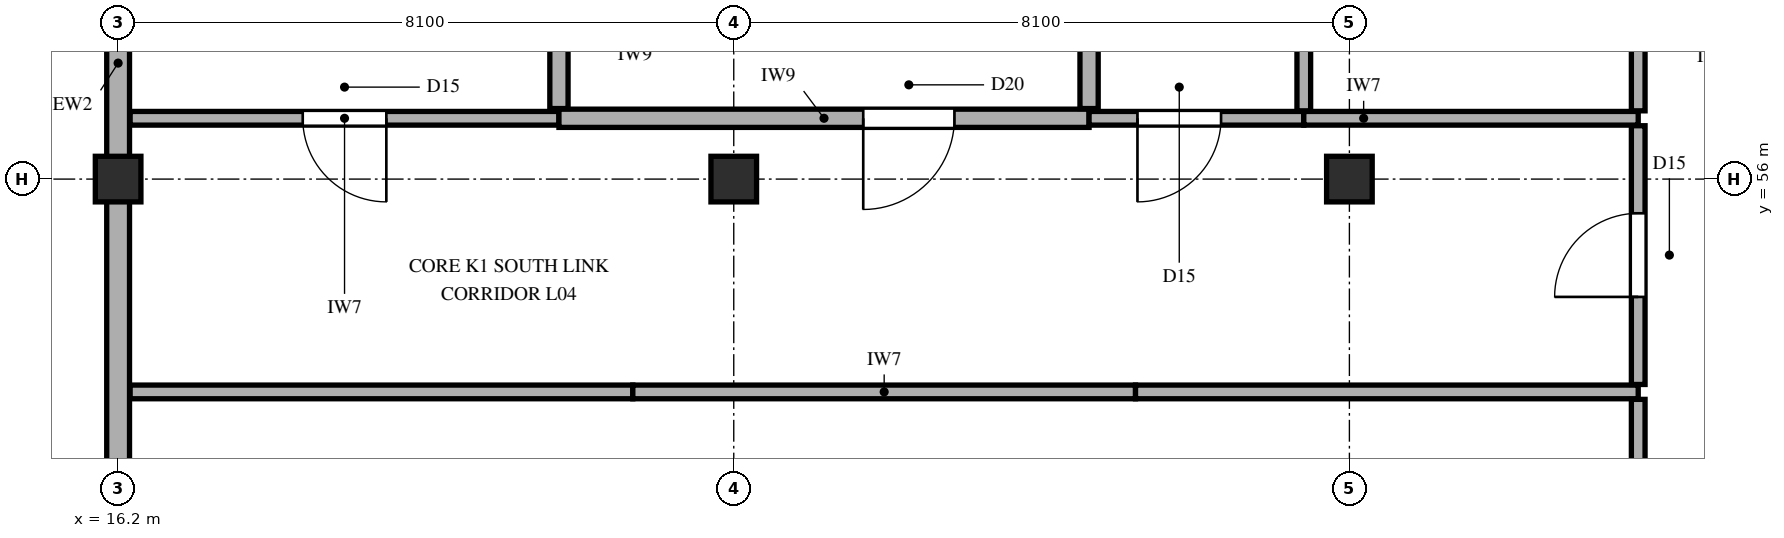
"""IFC4 building model, lengths in metres.
Left out: names, types, materials, properties, quantities, classifications, styles, units other than length and angle.
Written with IfcOpenShell. Run it as: python <this file> out.ifc"""

import sys

from ifc_helpers import new_model, si_unit, direction, frame, frame_2d, origin, origin_2d, place, context, subcontext, project, spatial, rectangle, extrude, element, fill, save


model = new_model("IFC4")
c1 = context("Model", 3, precision=1e-05, world=origin(), true_north=direction((0.0, 1.0)))
c2 = subcontext(c1, "Body", "Model", "MODEL_VIEW")
j1 = project(units=[si_unit("LENGTHUNIT", "METRE"), si_unit("PLANEANGLEUNIT", "RADIAN")], contexts=[c1])
p1 = place(None, origin())
s1 = spatial("IfcSite", under=j1, at=p1, CompositionType="ELEMENT")
p2 = place(p1, origin())
s2 = spatial("IfcBuilding", under=s1, at=p2, CompositionType="ELEMENT")
p3 = place(p2, frame((0.0, 0.0, 19.8)))
s3 = spatial("IfcBuildingStorey", under=s2, at=p3, CompositionType="ELEMENT", Elevation=19.8)
for number, where, z_axis, x_axis in (
    (1, (16.2, 56.0, 0.0), (0.0, 0.0, 1.0), (1.0, 0.0, 0.0)),
    (2, (24.3, 56.0, 0.0), (0.0, 0.0, 1.0), (1.0, 0.0, 0.0)),
    (3, (32.4, 56.0, 0.0), (0.0, 0.0, 1.0), (1.0, 0.0, 0.0)),
):
    element("IfcColumn", number, at=place(p3, frame(where, z_axis=z_axis, x_axis=x_axis)), inside=s3, PredefinedType="COLUMN", context=c2, shape_type="SweptSolid", body=[
        extrude(rectangle(XDim=0.6, YDim=0.6, at=origin_2d()), origin(), (0.0, 0.0, 1.0), 5.1),
    ])
p4 = place(p3, frame((16.2, 65.308, 0.0), z_axis=(0.0, 0.0, 1.0), x_axis=(0.0, -1.0, 0.0)))
e4 = element("IfcWall", 4, at=p4, inside=s3, PredefinedType="SOLIDWALL", context=c2, shape_type="SweptSolid", body=[
    extrude(rectangle(XDim=15.564, YDim=0.3, at=frame_2d((7.782, 0.0))), origin(), (0.0, 0.0, 1.0), 4.289),
])
for number, where, z_axis, x_axis in (
    (5, (16.358, 53.2, 0.0), (0.0, 0.0, 1.0), (1.0, 0.0, 0.0)),
    (6, (22.972, 53.2, 0.0), (0.0, 0.0, 1.0), (1.0, 0.0, 0.0)),
    (7, (29.586, 53.2, 0.0), (0.0, 0.0, 1.0), (1.0, 0.0, 0.0)),
):
    element("IfcWall", number, at=place(p3, frame(where, z_axis=z_axis, x_axis=x_axis)), inside=s3, PredefinedType="PARTITIONING", context=c2, shape_type="SweptSolid", body=[
        extrude(rectangle(XDim=6.614, YDim=0.18, at=frame_2d((3.307, 0.0))), origin(), (0.0, 0.0, 1.0), 4.86),
    ])
p5 = place(p3, frame((16.358, 56.8, 0.0), z_axis=(0.0, 0.0, 1.0), x_axis=(1.0, 0.0, 0.0)))
e8 = element("IfcWall", 8, at=p5, inside=s3, PredefinedType="PARTITIONING", context=c2, shape_type="SweptSolid", body=[
    extrude(rectangle(XDim=5.642, YDim=0.18, at=frame_2d((2.821, 0.0))), origin(), (0.0, 0.0, 1.0), 4.86),
])
p6 = place(p5, frame((2.271, 0.0, 0.0)))
e9 = element("IfcOpeningElement", 9, at=p6, cuts=e8, PredefinedType="OPENING", context=c2, shape_type="SweptSolid", body=[
    extrude(rectangle(XDim=1.1, YDim=2.2, at=frame_2d((0.55, 1.1))), frame((0.0, 0.1, 0.0), z_axis=(0.0, -1.0, 0.0), x_axis=(1.0, 0.0, 0.0)), (0.0, 0.0, 1.0), 0.2),
])
p7 = place(p3, frame((22.0, 56.8, 0.0), z_axis=(0.0, 0.0, 1.0), x_axis=(1.0, 0.0, 0.0)))
e10 = element("IfcWall", 10, at=p7, inside=s3, PredefinedType="PARTITIONING", context=c2, shape_type="SweptSolid", body=[
    extrude(rectangle(XDim=6.975, YDim=0.24, at=frame_2d((3.488, 0.0))), origin(), (0.0, 0.0, 1.0), 4.86),
])
p8 = place(p7, frame((4.003, 0.0, 0.0)))
e11 = element("IfcOpeningElement", 11, at=p8, cuts=e10, PredefinedType="OPENING", context=c2, shape_type="SweptSolid", body=[
    extrude(rectangle(XDim=1.2, YDim=2.3, at=frame_2d((0.6, 1.15))), frame((0.0, 0.13, 0.0), z_axis=(0.0, -1.0, 0.0), x_axis=(1.0, 0.0, 0.0)), (0.0, 0.0, 1.0), 0.26),
])
p9 = place(p3, frame((28.975, 56.8, 0.0), z_axis=(0.0, 0.0, 1.0), x_axis=(1.0, 0.0, 0.0)))
e12 = element("IfcWall", 12, at=p9, inside=s3, PredefinedType="PARTITIONING", context=c2, shape_type="SweptSolid", body=[
    extrude(rectangle(XDim=2.825, YDim=0.18, at=frame_2d((1.413, 0.0))), origin(), (0.0, 0.0, 1.0), 4.86),
])
p10 = place(p9, frame((0.636, 0.0, 0.0)))
e13 = element("IfcOpeningElement", 13, at=p10, cuts=e12, PredefinedType="OPENING", context=c2, shape_type="SweptSolid", body=[
    extrude(rectangle(XDim=1.1, YDim=2.2, at=frame_2d((0.55, 1.1))), frame((0.0, 0.1, 0.0), z_axis=(0.0, -1.0, 0.0), x_axis=(1.0, 0.0, 0.0)), (0.0, 0.0, 1.0), 0.2),
])
p11 = place(p3, frame((31.8, 56.8, 0.0), z_axis=(0.0, 0.0, 1.0), x_axis=(1.0, 0.0, 0.0)))
e14 = element("IfcWall", 14, at=p11, inside=s3, PredefinedType="PARTITIONING", context=c2, shape_type="SweptSolid", body=[
    extrude(rectangle(XDim=4.4, YDim=0.18, at=frame_2d((2.2, 0.0))), origin(), (0.0, 0.0, 1.0), 4.86),
])
p12 = place(p3, frame((22.0, 56.928, 0.0), z_axis=(0.0, 0.0, 1.0), x_axis=(0.0, 1.0, 0.0)))
e15 = element("IfcWall", 15, at=p12, inside=s3, PredefinedType="PARTITIONING", context=c2, shape_type="SweptSolid", body=[
    extrude(rectangle(XDim=3.214, YDim=0.24, at=frame_2d((1.607, 0.0))), origin(), (0.0, 0.0, 1.0), 4.86),
])
p13 = place(p12, frame((1.107, 0.0, 0.0)))
e16 = element("IfcOpeningElement", 16, at=p13, cuts=e15, PredefinedType="OPENING", context=c2, shape_type="SweptSolid", body=[
    extrude(rectangle(XDim=1.0, YDim=2.2, at=frame_2d((0.5, 1.1))), frame((0.0, 0.13, 0.0), z_axis=(0.0, -1.0, 0.0), x_axis=(1.0, 0.0, 0.0)), (0.0, 0.0, 1.0), 0.26),
])
p14 = place(p3, frame((28.975, 56.928, 0.0), z_axis=(0.0, 0.0, 1.0), x_axis=(0.0, 1.0, 0.0)))
e17 = element("IfcWall", 17, at=p14, inside=s3, PredefinedType="PARTITIONING", context=c2, shape_type="SweptSolid", body=[
    extrude(rectangle(XDim=3.214, YDim=0.24, at=frame_2d((1.607, 0.0))), origin(), (0.0, 0.0, 1.0), 4.86),
])
p15 = place(p3, frame((31.8, 56.898, 0.0), z_axis=(0.0, 0.0, 1.0), x_axis=(0.0, 1.0, 0.0)))
e18 = element("IfcWall", 18, at=p15, inside=s3, PredefinedType="PARTITIONING", context=c2, shape_type="SweptSolid", body=[
    extrude(rectangle(XDim=3.244, YDim=0.18, at=frame_2d((1.622, 0.0))), origin(), (0.0, 0.0, 1.0), 4.86),
])
p16 = place(p3, frame((36.2, 34.098, 0.0), z_axis=(0.0, 0.0, 1.0), x_axis=(0.0, 1.0, 0.0)))
e19 = element("IfcWall", 19, at=p16, inside=s3, PredefinedType="PARTITIONING", context=c2, shape_type="SweptSolid", body=[
    extrude(rectangle(XDim=19.004, YDim=0.18, at=frame_2d((9.502, 0.0))), origin(), (0.0, 0.0, 1.0), 4.405),
])
p17 = place(p16, frame((9.002, 0.0, 0.0)))
e20 = element("IfcOpeningElement", 20, at=p17, cuts=e19, PredefinedType="OPENING", context=c2, shape_type="SweptSolid", body=[
    extrude(rectangle(XDim=1.0, YDim=2.2, at=frame_2d((0.5, 1.1))), frame((0.0, 0.1, 0.0), z_axis=(0.0, -1.0, 0.0), x_axis=(1.0, 0.0, 0.0)), (0.0, 0.0, 1.0), 0.2),
])
p18 = place(p3, frame((36.2, 53.298, 0.0), z_axis=(0.0, 0.0, 1.0), x_axis=(0.0, 1.0, 0.0)))
e21 = element("IfcWall", 21, at=p18, inside=s3, PredefinedType="PARTITIONING", context=c2, shape_type="SweptSolid", body=[
    extrude(rectangle(XDim=3.404, YDim=0.18, at=frame_2d((1.702, 0.0))), origin(), (0.0, 0.0, 1.0), 4.405),
])
p19 = place(p18, frame((1.152, 0.0, 0.0)))
e22 = element("IfcOpeningElement", 22, at=p19, cuts=e21, PredefinedType="OPENING", context=c2, shape_type="SweptSolid", body=[
    extrude(rectangle(XDim=1.1, YDim=2.2, at=frame_2d((0.55, 1.1))), frame((0.0, 0.1, 0.0), z_axis=(0.0, -1.0, 0.0), x_axis=(1.0, 0.0, 0.0)), (0.0, 0.0, 1.0), 0.2),
])
p20 = place(p3, frame((36.2, 56.898, 0.0), z_axis=(0.0, 0.0, 1.0), x_axis=(0.0, 1.0, 0.0)))
e23 = element("IfcWall", 23, at=p20, inside=s3, PredefinedType="PARTITIONING", context=c2, shape_type="SweptSolid", body=[
    extrude(rectangle(XDim=3.404, YDim=0.18, at=frame_2d((1.702, 0.0))), origin(), (0.0, 0.0, 1.0), 4.86),
])
p21 = place(p20, frame((1.202, 0.0, 0.0)))
e24 = element("IfcOpeningElement", 24, at=p21, cuts=e23, PredefinedType="OPENING", context=c2, shape_type="SweptSolid", body=[
    extrude(rectangle(XDim=1.0, YDim=2.15, at=frame_2d((0.5, 1.075))), frame((0.0, 0.1, 0.0), z_axis=(0.0, -1.0, 0.0), x_axis=(1.0, 0.0, 0.0)), (0.0, 0.0, 1.0), 0.2),
])
p22 = place(p6, frame((1.1, 0.0, 0.0), z_axis=(0.0, 0.0, 1.0), x_axis=(-1.0, 0.0, 0.0)))
e25 = element("IfcDoor", 25, at=p22, inside=s3, OperationType="SINGLE_SWING_RIGHT", PredefinedType="DOOR", context=c2, shape_type="SweptSolid", body=[
    extrude(rectangle(XDim=1.1, YDim=2.2, at=frame_2d((0.55, 1.1))), frame((0.0, 0.025, 0.0), z_axis=(0.0, -1.0, 0.0), x_axis=(1.0, 0.0, 0.0)), (0.0, 0.0, 1.0), 0.05),
])
fill(e9, e25)
p23 = place(p8, frame((1.2, 0.0, 0.0), z_axis=(0.0, 0.0, 1.0), x_axis=(-1.0, 0.0, 0.0)))
e26 = element("IfcDoor", 26, at=p23, inside=s3, OperationType="SINGLE_SWING_LEFT", PredefinedType="DOOR", context=c2, shape_type="SweptSolid", body=[
    extrude(rectangle(XDim=1.2, YDim=2.3, at=frame_2d((0.6, 1.15))), frame((0.0, 0.025, 0.0), z_axis=(0.0, -1.0, 0.0), x_axis=(1.0, 0.0, 0.0)), (0.0, 0.0, 1.0), 0.05),
])
fill(e11, e26)
p24 = place(p10, frame((1.1, 0.0, 0.0), z_axis=(0.0, 0.0, 1.0), x_axis=(-1.0, 0.0, 0.0)))
e27 = element("IfcDoor", 27, at=p24, inside=s3, OperationType="SINGLE_SWING_LEFT", PredefinedType="DOOR", context=c2, shape_type="SweptSolid", body=[
    extrude(rectangle(XDim=1.1, YDim=2.2, at=frame_2d((0.55, 1.1))), frame((0.0, 0.025, 0.0), z_axis=(0.0, -1.0, 0.0), x_axis=(1.0, 0.0, 0.0)), (0.0, 0.0, 1.0), 0.05),
])
fill(e13, e27)
p25 = place(p19, origin())
e28 = element("IfcDoor", 28, at=p25, inside=s3, OperationType="SINGLE_SWING_LEFT", PredefinedType="DOOR", context=c2, shape_type="SweptSolid", body=[
    extrude(rectangle(XDim=1.1, YDim=2.2, at=frame_2d((0.55, 1.1))), frame((0.0, 0.025, 0.0), z_axis=(0.0, -1.0, 0.0), x_axis=(1.0, 0.0, 0.0)), (0.0, 0.0, 1.0), 0.05),
])
fill(e22, e28)
save(model, sys.argv[1])
